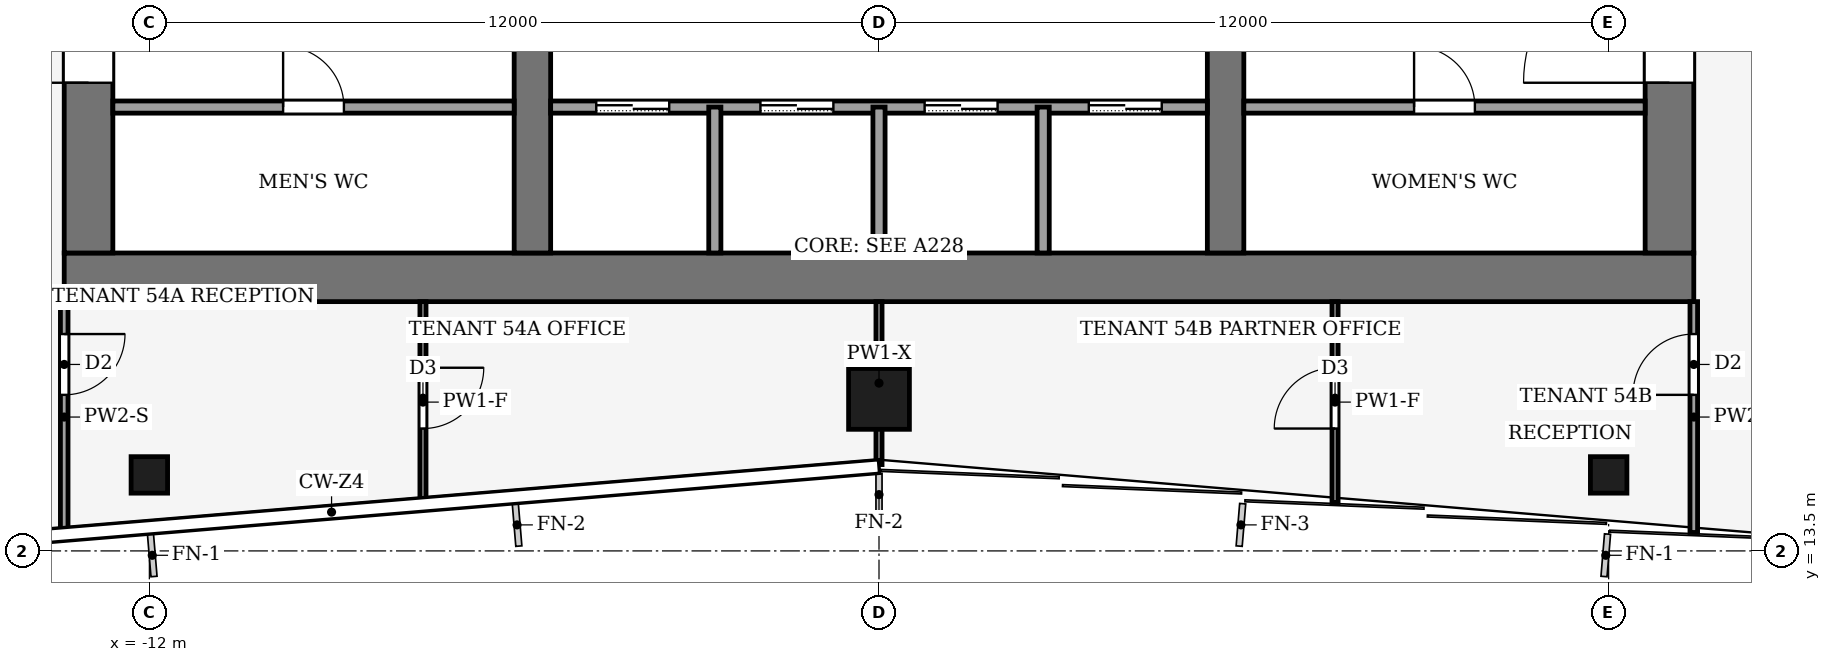
"""IFC4 building model, lengths in metres.
Left out: names, types, materials, properties, quantities, classifications, styles, units other than length and angle.
Written with IfcOpenShell. Run it as: python <this file> out.ifc"""

import sys

from ifc_helpers import new_model, si_unit, direction, frame, frame_2d, origin, origin_2d, place, context, subcontext, project, spatial, rectangle, hollow_rectangle, extrude, element, fill, save


model = new_model("IFC4")
c1 = context("Model", 3, precision=1e-05, world=origin(), true_north=direction((0.0, 1.0)))
c2 = subcontext(c1, "Body", "Model", "MODEL_VIEW")
j1 = project(units=[si_unit("LENGTHUNIT", "METRE"), si_unit("PLANEANGLEUNIT", "RADIAN")], contexts=[c1])
p1 = place(None, origin())
s1 = spatial("IfcSite", under=j1, at=p1, CompositionType="ELEMENT")
p2 = place(p1, origin())
s2 = spatial("IfcBuilding", under=s1, at=p2, CompositionType="ELEMENT")
p3 = place(p2, frame((0.0, 0.0, 238.0)))
s3 = spatial("IfcBuildingStorey", under=s2, at=p3, CompositionType="ELEMENT", Elevation=238.0)
p4 = place(p3, frame((-13.4, 18.0, -0.13), z_axis=(0.0, 0.0, 1.0), x_axis=(1.0, 0.0, 0.0)))
e1 = element("IfcWall", 1, at=p4, inside=s3, PredefinedType="SHEAR", context=c2, shape_type="SweptSolid", body=[
    extrude(rectangle(XDim=26.8, YDim=0.8, at=frame_2d((13.4, 0.0))), origin(), (0.0, 0.0, 1.0), 4.0),
])
p5 = place(p3, frame((-13.0, 18.4, -0.13), z_axis=(0.0, 0.0, 1.0), x_axis=(0.0, 1.0, 0.0)))
e2 = element("IfcWall", 2, at=p5, inside=s3, PredefinedType="SHEAR", context=c2, shape_type="SweptSolid", body=[
    extrude(rectangle(XDim=19.2, YDim=0.8, at=frame_2d((9.6, 0.0))), origin(), (0.0, 0.0, 1.0), 4.0),
])
p6 = place(p5, frame((2.8, 0.0, 0.13)))
e3 = element("IfcOpeningElement", 3, at=p6, cuts=e2, PredefinedType="OPENING", context=c2, shape_type="SweptSolid", body=[
    extrude(rectangle(XDim=2.4, YDim=2.4, at=frame_2d((1.2, 1.2))), frame((0.0, 0.41, 0.0), z_axis=(0.0, -1.0, 0.0), x_axis=(1.0, 0.0, 0.0)), (0.0, 0.0, 1.0), 0.82),
])
p7 = place(p5, frame((13.4, 0.0, 0.13)))
e4 = element("IfcOpeningElement", 4, at=p7, cuts=e2, PredefinedType="OPENING", context=c2, shape_type="SweptSolid", body=[
    extrude(rectangle(XDim=1.4, YDim=2.2, at=frame_2d((0.7, 1.1))), frame((0.0, 0.41, 0.0), z_axis=(0.0, -1.0, 0.0), x_axis=(1.0, 0.0, 0.0)), (0.0, 0.0, 1.0), 0.82),
])
p8 = place(p3, frame((13.0, 18.4, -0.13), z_axis=(0.0, 0.0, 1.0), x_axis=(0.0, 1.0, 0.0)))
e5 = element("IfcWall", 5, at=p8, inside=s3, PredefinedType="SHEAR", context=c2, shape_type="SweptSolid", body=[
    extrude(rectangle(XDim=19.2, YDim=0.8, at=frame_2d((9.6, 0.0))), origin(), (0.0, 0.0, 1.0), 4.0),
])
p9 = place(p8, frame((2.8, 0.0, 0.13)))
e6 = element("IfcOpeningElement", 6, at=p9, cuts=e5, PredefinedType="OPENING", context=c2, shape_type="SweptSolid", body=[
    extrude(rectangle(XDim=2.4, YDim=2.4, at=frame_2d((1.2, 1.2))), frame((0.0, 0.41, 0.0), z_axis=(0.0, -1.0, 0.0), x_axis=(1.0, 0.0, 0.0)), (0.0, 0.0, 1.0), 0.82),
])
p10 = place(p8, frame((13.3, 0.0, 0.13)))
e7 = element("IfcOpeningElement", 7, at=p10, cuts=e5, PredefinedType="OPENING", context=c2, shape_type="SweptSolid", body=[
    extrude(rectangle(XDim=2.4, YDim=2.4, at=frame_2d((1.2, 1.2))), frame((0.0, 0.41, 0.0), z_axis=(0.0, -1.0, 0.0), x_axis=(1.0, 0.0, 0.0)), (0.0, 0.0, 1.0), 0.82),
])
p11 = place(p3, frame((-5.7, 18.4, -0.13), z_axis=(0.0, 0.0, 1.0), x_axis=(0.0, 1.0, 0.0)))
e8 = element("IfcWall", 8, at=p11, inside=s3, PredefinedType="SHEAR", context=c2, shape_type="SweptSolid", body=[
    extrude(rectangle(XDim=19.2, YDim=0.6, at=frame_2d((9.6, 0.0))), origin(), (0.0, 0.0, 1.0), 4.0),
])
p12 = place(p11, frame((8.35, 0.0, 0.13)))
e9 = element("IfcOpeningElement", 9, at=p12, cuts=e8, PredefinedType="OPENING", context=c2, shape_type="SweptSolid", body=[
    extrude(rectangle(XDim=0.9, YDim=2.1, at=frame_2d((0.45, 1.05))), frame((0.0, 0.31, 0.0), z_axis=(0.0, -1.0, 0.0), x_axis=(1.0, 0.0, 0.0)), (0.0, 0.0, 1.0), 0.62),
])
p13 = place(p3, frame((5.7, 18.4, -0.13), z_axis=(0.0, 0.0, 1.0), x_axis=(0.0, 1.0, 0.0)))
e10 = element("IfcWall", 10, at=p13, inside=s3, PredefinedType="SHEAR", context=c2, shape_type="SweptSolid", body=[
    extrude(rectangle(XDim=19.2, YDim=0.6, at=frame_2d((9.6, 0.0))), origin(), (0.0, 0.0, 1.0), 4.0),
])
p14 = place(p13, frame((13.3, 0.0, 0.13)))
e11 = element("IfcOpeningElement", 11, at=p14, cuts=e10, PredefinedType="OPENING", context=c2, shape_type="SweptSolid", body=[
    extrude(rectangle(XDim=2.4, YDim=2.4, at=frame_2d((1.2, 1.2))), frame((0.0, 0.31, 0.0), z_axis=(0.0, -1.0, 0.0), x_axis=(1.0, 0.0, 0.0)), (0.0, 0.0, 1.0), 0.62),
])
p15 = place(p3, frame((0.0, 16.0, 0.0), z_axis=(0.0, 0.0, 1.0), x_axis=(1.0, 0.0, 0.0)))
e12 = element("IfcColumn", 12, at=p15, inside=s3, PredefinedType="COLUMN", context=c2, shape_type="SweptSolid", body=[
    extrude(hollow_rectangle(XDim=1.0, YDim=1.0, WallThickness=0.045, at=origin_2d()), origin(), (0.0, 0.0, 1.0), 4.0),
])
for number, where, z_axis, x_axis in (
    (13, (-12.0, 14.75, 0.0), (0.0, 0.0, 1.0), (1.0, 0.0, 0.0)),
    (14, (12.0, 14.75, 0.0), (0.0, 0.0, 1.0), (1.0, 0.0, 0.0)),
):
    element("IfcColumn", number, at=place(p3, frame(where, z_axis=z_axis, x_axis=x_axis)), inside=s3, PredefinedType="COLUMN", context=c2, shape_type="SweptSolid", body=[
        extrude(hollow_rectangle(XDim=0.6, YDim=0.6, WallThickness=0.025, at=origin_2d()), origin(), (0.0, 0.0, 1.0), 4.0),
    ])
p16 = place(p3, frame((-12.6, 20.8, 0.0), z_axis=(0.0, 0.0, 1.0), x_axis=(1.0, 0.0, 0.0)))
e15 = element("IfcWall", 15, at=p16, inside=s3, PredefinedType="PARTITIONING", context=c2, shape_type="SweptSolid", body=[
    extrude(rectangle(XDim=6.6, YDim=0.2, at=frame_2d((3.3, 0.0))), origin(), (0.0, 0.0, 1.0), 3.87),
])
p17 = place(p16, frame((2.8, 0.0, 0.0)))
e16 = element("IfcOpeningElement", 16, at=p17, cuts=e15, PredefinedType="OPENING", context=c2, shape_type="SweptSolid", body=[
    extrude(rectangle(XDim=1.0, YDim=2.1, at=frame_2d((0.5, 1.05))), frame((0.0, 0.11, 0.0), z_axis=(0.0, -1.0, 0.0), x_axis=(1.0, 0.0, 0.0)), (0.0, 0.0, 1.0), 0.22),
])
p18 = place(p3, frame((-5.4, 20.8, 0.0), z_axis=(0.0, 0.0, 1.0), x_axis=(1.0, 0.0, 0.0)))
e17 = element("IfcWall", 17, at=p18, inside=s3, PredefinedType="PARTITIONING", context=c2, shape_type="SweptSolid", body=[
    extrude(rectangle(XDim=10.8, YDim=0.2, at=frame_2d((5.4, 0.0))), origin(), (0.0, 0.0, 1.0), 3.87),
])
p19 = place(p18, frame((0.75, 0.0, 0.0)))
e18 = element("IfcOpeningElement", 18, at=p19, cuts=e17, PredefinedType="OPENING", context=c2, shape_type="SweptSolid", body=[
    extrude(rectangle(XDim=1.2, YDim=2.2, at=frame_2d((0.6, 1.1))), frame((0.0, 0.11, 0.0), z_axis=(0.0, -1.0, 0.0), x_axis=(1.0, 0.0, 0.0)), (0.0, 0.0, 1.0), 0.22),
])
p20 = place(p18, frame((3.45, 0.0, 0.0)))
e19 = element("IfcOpeningElement", 19, at=p20, cuts=e17, PredefinedType="OPENING", context=c2, shape_type="SweptSolid", body=[
    extrude(rectangle(XDim=1.2, YDim=2.2, at=frame_2d((0.6, 1.1))), frame((0.0, 0.11, 0.0), z_axis=(0.0, -1.0, 0.0), x_axis=(1.0, 0.0, 0.0)), (0.0, 0.0, 1.0), 0.22),
])
p21 = place(p18, frame((6.15, 0.0, 0.0)))
e20 = element("IfcOpeningElement", 20, at=p21, cuts=e17, PredefinedType="OPENING", context=c2, shape_type="SweptSolid", body=[
    extrude(rectangle(XDim=1.2, YDim=2.2, at=frame_2d((0.6, 1.1))), frame((0.0, 0.11, 0.0), z_axis=(0.0, -1.0, 0.0), x_axis=(1.0, 0.0, 0.0)), (0.0, 0.0, 1.0), 0.22),
])
p22 = place(p18, frame((8.85, 0.0, 0.0)))
e21 = element("IfcOpeningElement", 21, at=p22, cuts=e17, PredefinedType="OPENING", context=c2, shape_type="SweptSolid", body=[
    extrude(rectangle(XDim=1.2, YDim=2.2, at=frame_2d((0.6, 1.1))), frame((0.0, 0.11, 0.0), z_axis=(0.0, -1.0, 0.0), x_axis=(1.0, 0.0, 0.0)), (0.0, 0.0, 1.0), 0.22),
])
p23 = place(p3, frame((6.0, 20.8, 0.0), z_axis=(0.0, 0.0, 1.0), x_axis=(1.0, 0.0, 0.0)))
e22 = element("IfcWall", 22, at=p23, inside=s3, PredefinedType="PARTITIONING", context=c2, shape_type="SweptSolid", body=[
    extrude(rectangle(XDim=6.6, YDim=0.2, at=frame_2d((3.3, 0.0))), origin(), (0.0, 0.0, 1.0), 3.87),
])
p24 = place(p23, frame((2.8, 0.0, 0.0)))
e23 = element("IfcOpeningElement", 23, at=p24, cuts=e22, PredefinedType="OPENING", context=c2, shape_type="SweptSolid", body=[
    extrude(rectangle(XDim=1.0, YDim=2.1, at=frame_2d((0.5, 1.05))), frame((0.0, 0.11, 0.0), z_axis=(0.0, -1.0, 0.0), x_axis=(1.0, 0.0, 0.0)), (0.0, 0.0, 1.0), 0.22),
])
for number, where, z_axis, x_axis in (
    (24, (-2.7, 18.4, 0.0), (0.0, 0.0, 1.0), (0.0, 1.0, 0.0)),
    (25, (0.0, 18.4, 0.0), (0.0, 0.0, 1.0), (0.0, 1.0, 0.0)),
    (26, (2.7, 18.4, 0.0), (0.0, 0.0, 1.0), (0.0, 1.0, 0.0)),
):
    element("IfcWall", number, at=place(p3, frame(where, z_axis=z_axis, x_axis=x_axis)), inside=s3, PredefinedType="PARTITIONING", context=c2, shape_type="SweptSolid", body=[
        extrude(rectangle(XDim=2.4, YDim=0.2, at=frame_2d((1.2, 0.0))), origin(), (0.0, 0.0, 1.0), 3.87),
    ])
p25 = place(p3, frame((-13.4, 17.6, 0.0), z_axis=(0.0, 0.0, 1.0), x_axis=(0.0, -1.0, 0.0)))
e27 = element("IfcWall", 27, at=p25, inside=s3, PredefinedType="PARTITIONING", context=c2, shape_type="SweptSolid", body=[
    extrude(rectangle(XDim=3.797, YDim=0.125, at=frame_2d((1.898, 0.0))), origin(), (0.0, 0.0, 1.0), 3.04),
])
p26 = place(p25, frame((0.533, 0.0, 0.0)))
e28 = element("IfcOpeningElement", 28, at=p26, cuts=e27, PredefinedType="OPENING", context=c2, shape_type="SweptSolid", body=[
    extrude(rectangle(XDim=1.0, YDim=2.1, at=frame_2d((0.5, 1.05))), frame((0.0, 0.073, 0.0), z_axis=(0.0, -1.0, 0.0), x_axis=(1.0, 0.0, 0.0)), (0.0, 0.0, 1.0), 0.145),
])
p27 = place(p3, frame((13.4, 13.803, 0.0), z_axis=(0.0, 0.0, 1.0), x_axis=(0.0, 1.0, 0.0)))
e29 = element("IfcWall", 29, at=p27, inside=s3, PredefinedType="PARTITIONING", context=c2, shape_type="SweptSolid", body=[
    extrude(rectangle(XDim=3.797, YDim=0.125, at=frame_2d((1.898, 0.0))), origin(), (0.0, 0.0, 1.0), 3.04),
])
p28 = place(p27, frame((2.263, 0.0, 0.0)))
e30 = element("IfcOpeningElement", 30, at=p28, cuts=e29, PredefinedType="OPENING", context=c2, shape_type="SweptSolid", body=[
    extrude(rectangle(XDim=1.0, YDim=2.1, at=frame_2d((0.5, 1.05))), frame((0.0, 0.073, 0.0), z_axis=(0.0, -1.0, 0.0), x_axis=(1.0, 0.0, 0.0)), (0.0, 0.0, 1.0), 0.145),
])
p29 = place(p3, frame((-7.5, 17.6, 0.0), z_axis=(0.0, 0.0, 1.0), x_axis=(0.0, -1.0, 0.0)))
e31 = element("IfcWall", 31, at=p29, inside=s3, PredefinedType="PARTITIONING", context=c2, shape_type="SweptSolid", body=[
    extrude(rectangle(XDim=3.305, YDim=0.1, at=frame_2d((1.653, 0.0))), origin(), (0.0, 0.0, 1.0), 3.04),
])
p30 = place(p29, frame((1.087, 0.0, 0.0)))
e32 = element("IfcOpeningElement", 32, at=p30, cuts=e31, PredefinedType="OPENING", context=c2, shape_type="SweptSolid", body=[
    extrude(rectangle(XDim=1.0, YDim=2.1, at=frame_2d((0.5, 1.05))), frame((0.0, 0.06, 0.0), z_axis=(0.0, -1.0, 0.0), x_axis=(1.0, 0.0, 0.0)), (0.0, 0.0, 1.0), 0.12),
])
p31 = place(p3, frame((0.0, 14.92, 0.0), z_axis=(0.0, 0.0, 1.0), x_axis=(0.0, 1.0, 0.0)))
e33 = element("IfcWall", 33, at=p31, inside=s3, PredefinedType="PARTITIONING", context=c2, shape_type="SweptSolid", body=[
    extrude(rectangle(XDim=2.68, YDim=0.1, at=frame_2d((1.34, 0.0))), origin(), (0.0, 0.0, 1.0), 3.54),
])
p32 = place(p3, frame((7.5, 14.295, 0.0), z_axis=(0.0, 0.0, 1.0), x_axis=(0.0, 1.0, 0.0)))
e34 = element("IfcWall", 34, at=p32, inside=s3, PredefinedType="PARTITIONING", context=c2, shape_type="SweptSolid", body=[
    extrude(rectangle(XDim=3.305, YDim=0.1, at=frame_2d((1.653, 0.0))), origin(), (0.0, 0.0, 1.0), 3.04),
])
p33 = place(p32, frame((1.218, 0.0, 0.0)))
e35 = element("IfcOpeningElement", 35, at=p33, cuts=e34, PredefinedType="OPENING", context=c2, shape_type="SweptSolid", body=[
    extrude(rectangle(XDim=1.0, YDim=2.1, at=frame_2d((0.5, 1.05))), frame((0.0, 0.06, 0.0), z_axis=(0.0, -1.0, 0.0), x_axis=(1.0, 0.0, 0.0)), (0.0, 0.0, 1.0), 0.12),
])
p34 = place(p19, origin())
e36 = element("IfcDoor", 36, at=p34, inside=s3, OperationType="SLIDING_TO_LEFT", PredefinedType="DOOR", context=c2, shape_type="SweptSolid", body=[
    extrude(rectangle(XDim=1.2, YDim=2.2, at=frame_2d((0.6, 1.1))), frame((0.0, 0.025, 0.0), z_axis=(0.0, -1.0, 0.0), x_axis=(1.0, 0.0, 0.0)), (0.0, 0.0, 1.0), 0.05),
])
fill(e18, e36)
p35 = place(p20, origin())
e37 = element("IfcDoor", 37, at=p35, inside=s3, OperationType="SLIDING_TO_LEFT", PredefinedType="DOOR", context=c2, shape_type="SweptSolid", body=[
    extrude(rectangle(XDim=1.2, YDim=2.2, at=frame_2d((0.6, 1.1))), frame((0.0, 0.025, 0.0), z_axis=(0.0, -1.0, 0.0), x_axis=(1.0, 0.0, 0.0)), (0.0, 0.0, 1.0), 0.05),
])
fill(e19, e37)
p36 = place(p21, origin())
e38 = element("IfcDoor", 38, at=p36, inside=s3, OperationType="SLIDING_TO_LEFT", PredefinedType="DOOR", context=c2, shape_type="SweptSolid", body=[
    extrude(rectangle(XDim=1.2, YDim=2.2, at=frame_2d((0.6, 1.1))), frame((0.0, 0.025, 0.0), z_axis=(0.0, -1.0, 0.0), x_axis=(1.0, 0.0, 0.0)), (0.0, 0.0, 1.0), 0.05),
])
fill(e20, e38)
p37 = place(p22, origin())
e39 = element("IfcDoor", 39, at=p37, inside=s3, OperationType="SLIDING_TO_LEFT", PredefinedType="DOOR", context=c2, shape_type="SweptSolid", body=[
    extrude(rectangle(XDim=1.2, YDim=2.2, at=frame_2d((0.6, 1.1))), frame((0.0, 0.025, 0.0), z_axis=(0.0, -1.0, 0.0), x_axis=(1.0, 0.0, 0.0)), (0.0, 0.0, 1.0), 0.05),
])
fill(e21, e39)
p38 = place(p17, origin())
e40 = element("IfcDoor", 40, at=p38, inside=s3, OperationType="SINGLE_SWING_LEFT", PredefinedType="DOOR", context=c2, shape_type="SweptSolid", body=[
    extrude(rectangle(XDim=1.0, YDim=2.1, at=frame_2d((0.5, 1.05))), frame((0.0, 0.025, 0.0), z_axis=(0.0, -1.0, 0.0), x_axis=(1.0, 0.0, 0.0)), (0.0, 0.0, 1.0), 0.05),
])
fill(e16, e40)
p39 = place(p24, origin())
e41 = element("IfcDoor", 41, at=p39, inside=s3, OperationType="SINGLE_SWING_RIGHT", PredefinedType="DOOR", context=c2, shape_type="SweptSolid", body=[
    extrude(rectangle(XDim=1.0, YDim=2.1, at=frame_2d((0.5, 1.05))), frame((0.0, 0.025, 0.0), z_axis=(0.0, -1.0, 0.0), x_axis=(1.0, 0.0, 0.0)), (0.0, 0.0, 1.0), 0.05),
])
fill(e23, e41)
p40 = place(p6, origin())
e42 = element("IfcDoor", 42, at=p40, inside=s3, OperationType="DOUBLE_DOOR_SINGLE_SWING", PredefinedType="DOOR", context=c2, shape_type="SweptSolid", body=[
    extrude(rectangle(XDim=2.4, YDim=2.4, at=frame_2d((1.2, 1.2))), frame((0.0, 0.025, 0.0), z_axis=(0.0, -1.0, 0.0), x_axis=(1.0, 0.0, 0.0)), (0.0, 0.0, 1.0), 0.05),
])
fill(e3, e42)
p41 = place(p9, origin())
e43 = element("IfcDoor", 43, at=p41, inside=s3, OperationType="DOUBLE_DOOR_SINGLE_SWING", PredefinedType="DOOR", context=c2, shape_type="SweptSolid", body=[
    extrude(rectangle(XDim=2.4, YDim=2.4, at=frame_2d((1.2, 1.2))), frame((0.0, 0.025, 0.0), z_axis=(0.0, -1.0, 0.0), x_axis=(1.0, 0.0, 0.0)), (0.0, 0.0, 1.0), 0.05),
])
fill(e6, e43)
p42 = place(p26, origin())
e44 = element("IfcDoor", 44, at=p42, inside=s3, OperationType="SINGLE_SWING_LEFT", PredefinedType="DOOR", context=c2, shape_type="SweptSolid", body=[
    extrude(rectangle(XDim=1.0, YDim=2.1, at=frame_2d((0.5, 1.05))), frame((0.0, 0.025, 0.0), z_axis=(0.0, -1.0, 0.0), x_axis=(1.0, 0.0, 0.0)), (0.0, 0.0, 1.0), 0.05),
])
fill(e28, e44)
p43 = place(p28, origin())
e45 = element("IfcDoor", 45, at=p43, inside=s3, OperationType="SINGLE_SWING_RIGHT", PredefinedType="DOOR", context=c2, shape_type="SweptSolid", body=[
    extrude(rectangle(XDim=1.0, YDim=2.1, at=frame_2d((0.5, 1.05))), frame((0.0, 0.025, 0.0), z_axis=(0.0, -1.0, 0.0), x_axis=(1.0, 0.0, 0.0)), (0.0, 0.0, 1.0), 0.05),
])
fill(e30, e45)
p44 = place(p30, origin())
e46 = element("IfcDoor", 46, at=p44, inside=s3, OperationType="SINGLE_SWING_LEFT", PredefinedType="DOOR", context=c2, shape_type="SweptSolid", body=[
    extrude(rectangle(XDim=1.0, YDim=2.1, at=frame_2d((0.5, 1.05))), frame((0.0, 0.025, 0.0), z_axis=(0.0, -1.0, 0.0), x_axis=(1.0, 0.0, 0.0)), (0.0, 0.0, 1.0), 0.05),
])
fill(e32, e46)
p45 = place(p33, origin())
e47 = element("IfcDoor", 47, at=p45, inside=s3, OperationType="SINGLE_SWING_RIGHT", PredefinedType="DOOR", context=c2, shape_type="SweptSolid", body=[
    extrude(rectangle(XDim=1.0, YDim=2.1, at=frame_2d((0.5, 1.05))), frame((0.0, 0.025, 0.0), z_axis=(0.0, -1.0, 0.0), x_axis=(1.0, 0.0, 0.0)), (0.0, 0.0, 1.0), 0.05),
])
fill(e35, e47)
save(model, sys.argv[1])
